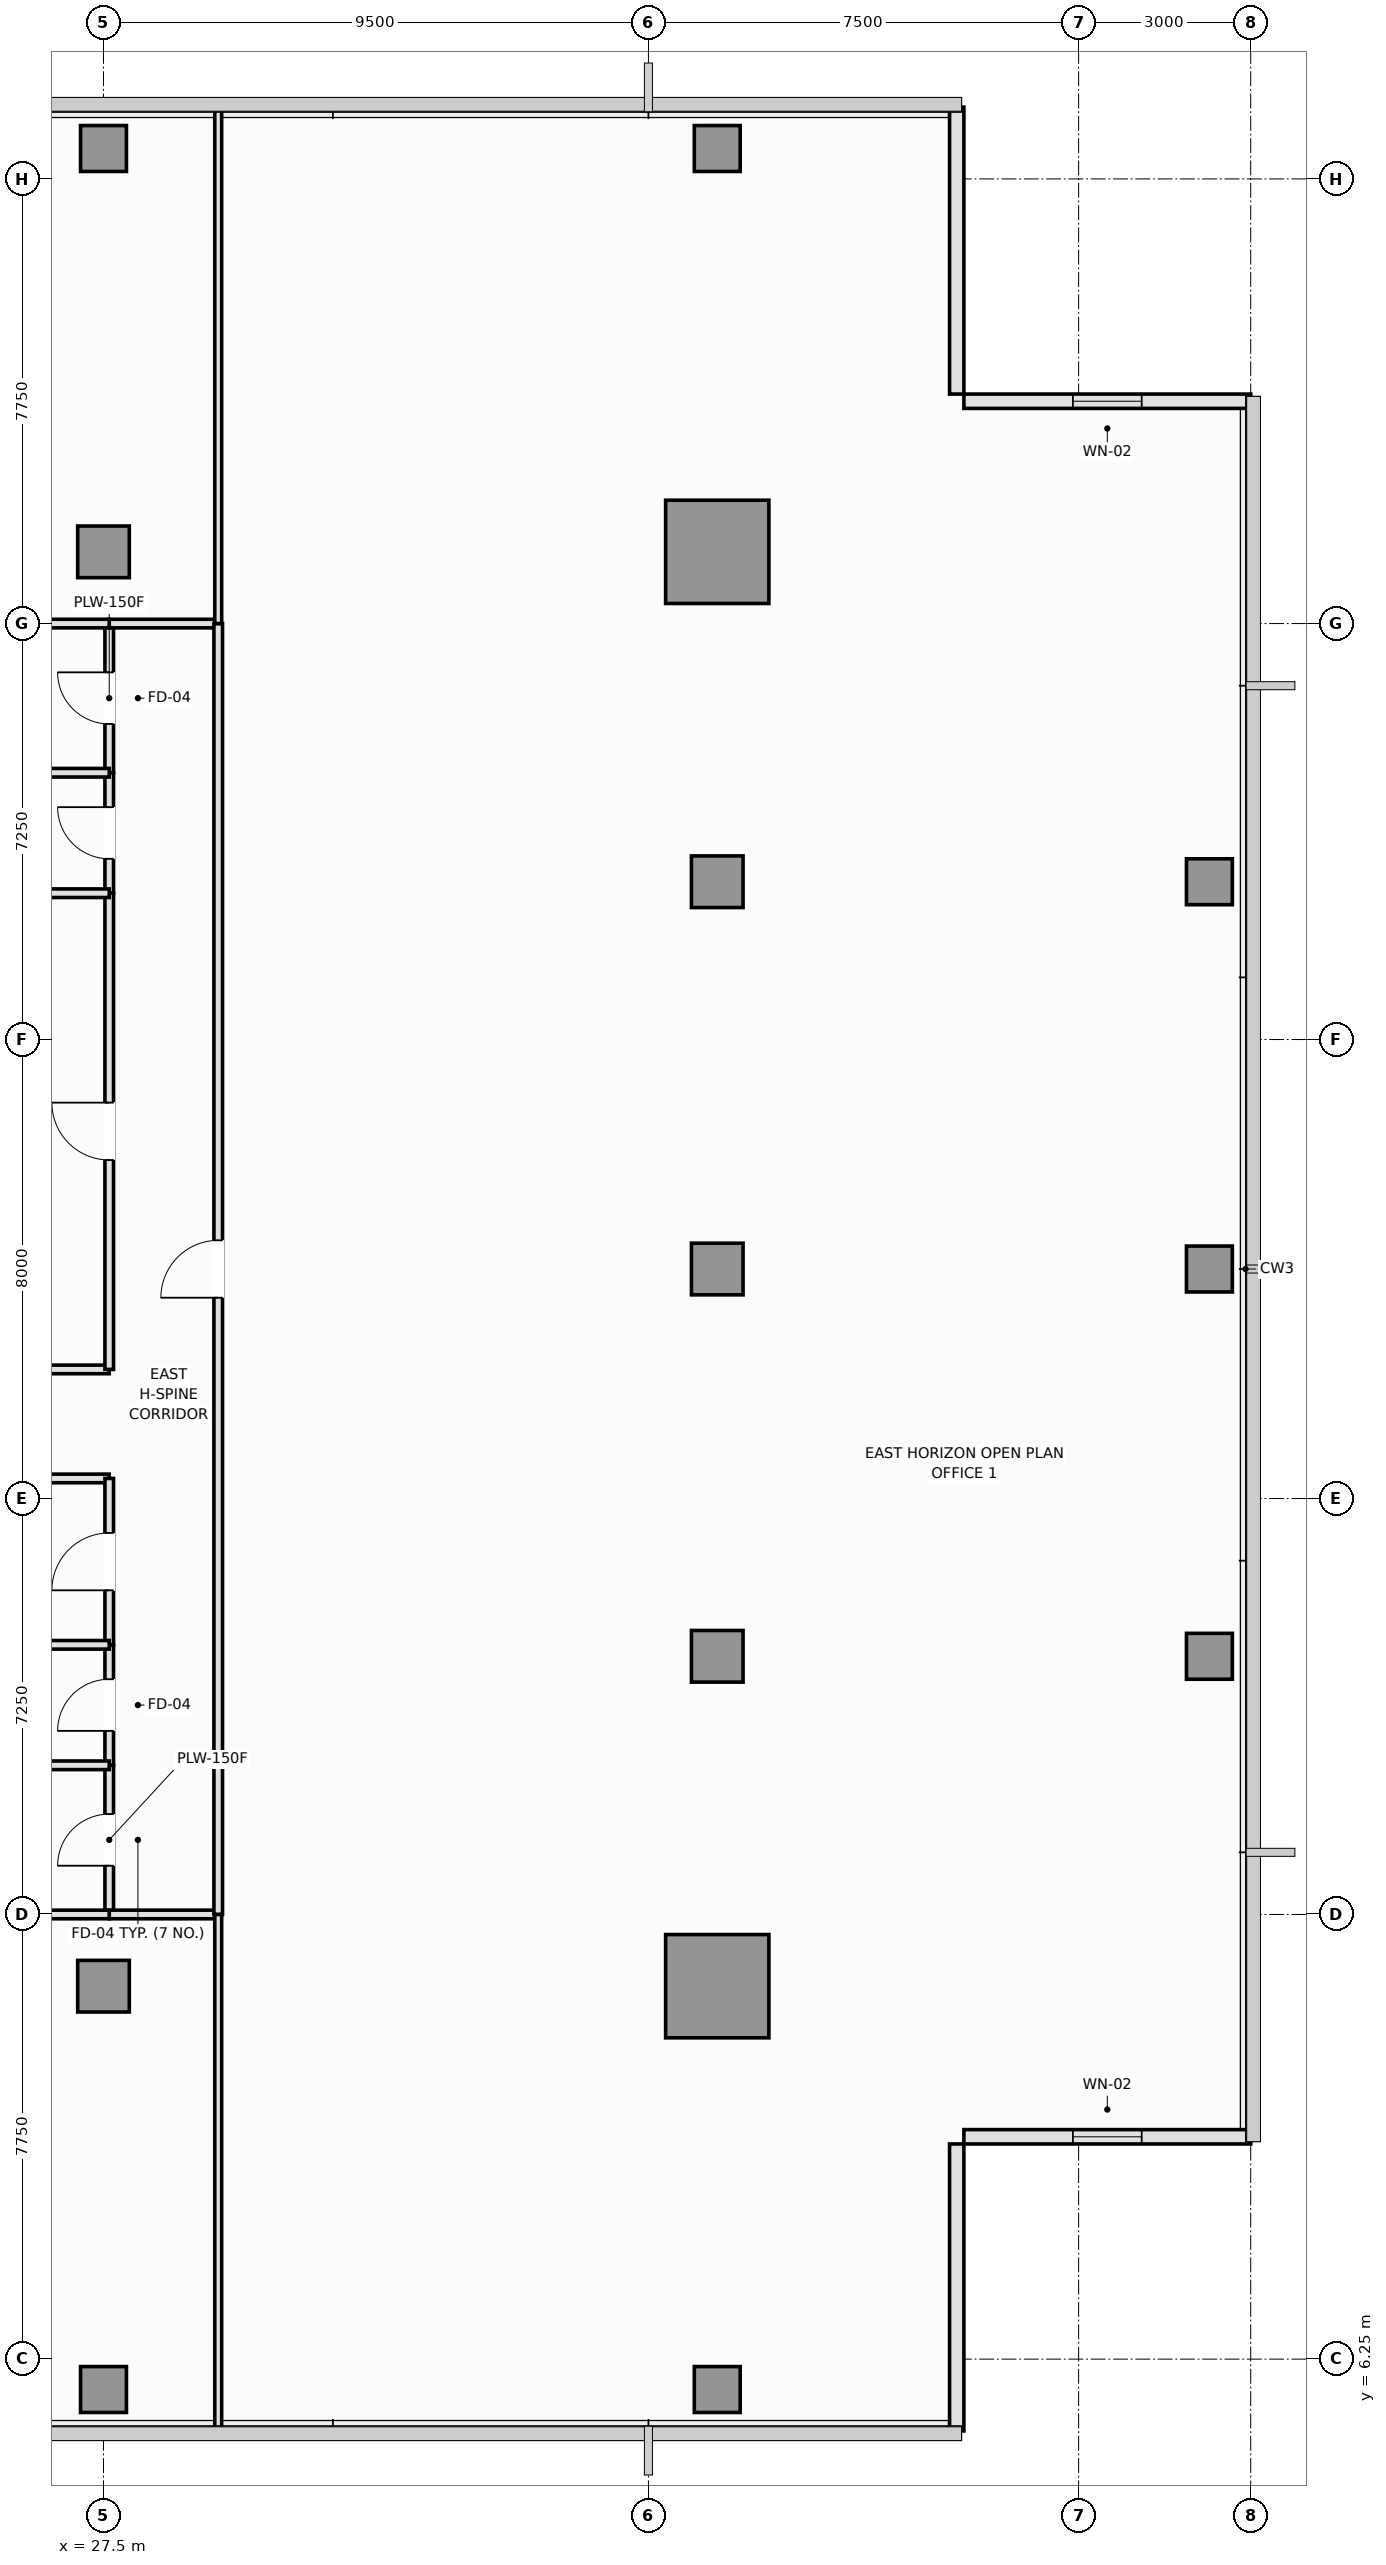
"""IFC4 building model, lengths in metres.
Left out: names, types, materials, properties, quantities, classifications, styles, units other than length and angle.
Written with IfcOpenShell. Run it as: python <this file> out.ifc"""

import sys

from ifc_helpers import new_model, si_unit, direction, frame, frame_2d, origin, origin_2d, place, context, subcontext, project, spatial, rectangle, extrude, element, fill, save


model = new_model("IFC4")
c1 = context("Model", 3, precision=1e-05, world=origin(), true_north=direction((0.0, 1.0)))
c2 = subcontext(c1, "Body", "Model", "MODEL_VIEW")
j1 = project(units=[si_unit("LENGTHUNIT", "METRE"), si_unit("PLANEANGLEUNIT", "RADIAN")], contexts=[c1])
p1 = place(None, origin())
s1 = spatial("IfcSite", under=j1, at=p1, CompositionType="ELEMENT")
p2 = place(p1, origin())
s2 = spatial("IfcBuilding", under=s1, at=p2, CompositionType="ELEMENT")
p3 = place(p2, frame((0.0, 0.0, 191.6)))
s3 = spatial("IfcBuildingStorey", under=s2, at=p3, CompositionType="ELEMENT", Elevation=191.6)
for number, where, z_axis, x_axis in (
    (1, (38.2, 12.75, 0.0), (0.0, 0.0, 1.0), (1.0, 0.0, 0.0)),
    (2, (38.2, 37.75, 0.0), (0.0, 0.0, 1.0), (1.0, 0.0, 0.0)),
):
    element("IfcColumn", number, at=place(p3, frame(where, z_axis=z_axis, x_axis=x_axis)), inside=s3, PredefinedType="COLUMN", context=c2, shape_type="SweptSolid", body=[
        extrude(rectangle(XDim=1.8, YDim=1.8, at=origin_2d()), origin(), (0.0, 0.0, 1.0), 3.55),
    ])
for number, where, z_axis, x_axis in (
    (3, (27.5, 12.75, 0.0), (0.0, 0.0, 1.0), (1.0, 0.0, 0.0)),
    (4, (27.5, 37.75, 0.0), (0.0, 0.0, 1.0), (1.0, 0.0, 0.0)),
    (5, (38.2, 18.5, 0.0), (0.0, 0.0, 1.0), (1.0, 0.0, 0.0)),
    (6, (38.2, 25.25, 0.0), (0.0, 0.0, 1.0), (1.0, 0.0, 0.0)),
    (7, (38.2, 32.0, 0.0), (0.0, 0.0, 1.0), (1.0, 0.0, 0.0)),
):
    element("IfcColumn", number, at=place(p3, frame(where, z_axis=z_axis, x_axis=x_axis)), inside=s3, PredefinedType="COLUMN", context=c2, shape_type="SweptSolid", body=[
        extrude(rectangle(XDim=0.9, YDim=0.9, at=origin_2d()), origin(), (0.0, 0.0, 1.0), 3.55),
    ])
for number, where, z_axis, x_axis in (
    (8, (46.78, 18.5, 0.0), (0.0, 0.0, 1.0), (1.0, 0.0, 0.0)),
    (9, (46.78, 25.25, 0.0), (0.0, 0.0, 1.0), (1.0, 0.0, 0.0)),
    (10, (46.78, 32.0, 0.0), (0.0, 0.0, 1.0), (1.0, 0.0, 0.0)),
    (11, (27.5, 5.72, 0.0), (0.0, 0.0, 1.0), (1.0, 0.0, 0.0)),
    (12, (38.2, 5.72, 0.0), (0.0, 0.0, 1.0), (1.0, 0.0, 0.0)),
    (13, (27.5, 44.78, 0.0), (0.0, 0.0, 1.0), (1.0, 0.0, 0.0)),
    (14, (38.2, 44.78, 0.0), (0.0, 0.0, 1.0), (1.0, 0.0, 0.0)),
):
    element("IfcColumn", number, at=place(p3, frame(where, z_axis=z_axis, x_axis=x_axis)), inside=s3, PredefinedType="COLUMN", context=c2, shape_type="SweptSolid", body=[
        extrude(rectangle(XDim=0.8, YDim=0.8, at=origin_2d()), origin(), (0.0, 0.0, 1.0), 3.55),
    ])
p4 = place(p3, frame((42.375, 5.0, 0.0), z_axis=(0.0, 0.0, 1.0), x_axis=(0.0, 1.0, 0.0)))
e15 = element("IfcWall", 15, at=p4, inside=s3, PredefinedType="SOLIDWALL", context=c2, shape_type="SweptSolid", body=[
    extrude(rectangle(XDim=5.0, YDim=0.25, at=frame_2d((2.5, 0.0))), origin(), (0.0, 0.0, 1.0), 3.37),
])
p5 = place(p3, frame((42.5, 10.125, 0.0), z_axis=(0.0, 0.0, 1.0), x_axis=(1.0, 0.0, 0.0)))
e16 = element("IfcWall", 16, at=p5, inside=s3, PredefinedType="SOLIDWALL", context=c2, shape_type="SweptSolid", body=[
    extrude(rectangle(XDim=5.0, YDim=0.25, at=frame_2d((2.5, 0.0))), origin(), (0.0, 0.0, 1.0), 3.37),
])
p6 = place(p5, frame((1.9, 0.0, 0.9)))
e17 = element("IfcOpeningElement", 17, at=p6, cuts=e16, PredefinedType="OPENING", context=c2, shape_type="SweptSolid", body=[
    extrude(rectangle(XDim=1.2, YDim=1.8, at=frame_2d((0.6, 0.9))), frame((0.0, 0.135, 0.0), z_axis=(0.0, -1.0, 0.0), x_axis=(1.0, 0.0, 0.0)), (0.0, 0.0, 1.0), 0.27),
])
p7 = place(p3, frame((47.5, 40.375, 0.0), z_axis=(0.0, 0.0, 1.0), x_axis=(-1.0, 0.0, 0.0)))
e18 = element("IfcWall", 18, at=p7, inside=s3, PredefinedType="SOLIDWALL", context=c2, shape_type="SweptSolid", body=[
    extrude(rectangle(XDim=5.0, YDim=0.25, at=frame_2d((2.5, 0.0))), origin(), (0.0, 0.0, 1.0), 3.37),
])
p8 = place(p7, frame((1.9, 0.0, 0.9)))
e19 = element("IfcOpeningElement", 19, at=p8, cuts=e18, PredefinedType="OPENING", context=c2, shape_type="SweptSolid", body=[
    extrude(rectangle(XDim=1.2, YDim=1.8, at=frame_2d((0.6, 0.9))), frame((0.0, 0.135, 0.0), z_axis=(0.0, -1.0, 0.0), x_axis=(1.0, 0.0, 0.0)), (0.0, 0.0, 1.0), 0.27),
])
p9 = place(p3, frame((42.375, 40.5, 0.0), z_axis=(0.0, 0.0, 1.0), x_axis=(0.0, 1.0, 0.0)))
e20 = element("IfcWall", 20, at=p9, inside=s3, PredefinedType="SOLIDWALL", context=c2, shape_type="SweptSolid", body=[
    extrude(rectangle(XDim=5.0, YDim=0.25, at=frame_2d((2.5, 0.0))), origin(), (0.0, 0.0, 1.0), 3.37),
])
p10 = place(p3, frame((24.29, 21.6, 0.0), z_axis=(0.0, 0.0, 1.0), x_axis=(1.0, 0.0, 0.0)))
e21 = element("IfcWall", 21, at=p10, inside=s3, PredefinedType="PARTITIONING", context=c2, shape_type="SweptSolid", body=[
    extrude(rectangle(XDim=3.31, YDim=0.15, at=frame_2d((1.655, 0.0))), origin(), (0.0, 0.0, 1.0), 3.37),
])
p11 = place(p3, frame((23.06, 23.5, 0.0), z_axis=(0.0, 0.0, 1.0), x_axis=(1.0, 0.0, 0.0)))
e22 = element("IfcWall", 22, at=p11, inside=s3, PredefinedType="PARTITIONING", context=c2, shape_type="SweptSolid", body=[
    extrude(rectangle(XDim=4.54, YDim=0.15, at=frame_2d((2.27, 0.0))), origin(), (0.0, 0.0, 1.0), 3.37),
])
p12 = place(p3, frame((27.6, 14.0, 0.0), z_axis=(0.0, 0.0, 1.0), x_axis=(0.0, 1.0, 0.0)))
e23 = element("IfcWall", 23, at=p12, inside=s3, PredefinedType="PLUMBINGWALL", context=c2, shape_type="SweptSolid", body=[
    extrude(rectangle(XDim=2.6, YDim=0.15, at=frame_2d((1.3, 0.0))), origin(), (0.0, 0.0, 1.0), 3.37),
])
p13 = place(p12, frame((0.85, 0.0, 0.0)))
e24 = element("IfcOpeningElement", 24, at=p13, cuts=e23, PredefinedType="OPENING", context=c2, shape_type="SweptSolid", body=[
    extrude(rectangle(XDim=0.9, YDim=2.1, at=frame_2d((0.45, 1.05))), frame((0.0, 0.085, 0.0), z_axis=(0.0, -1.0, 0.0), x_axis=(1.0, 0.0, 0.0)), (0.0, 0.0, 1.0), 0.17),
])
p14 = place(p3, frame((27.6, 33.9, 0.0), z_axis=(0.0, 0.0, 1.0), x_axis=(0.0, 1.0, 0.0)))
e25 = element("IfcWall", 25, at=p14, inside=s3, PredefinedType="PLUMBINGWALL", context=c2, shape_type="SweptSolid", body=[
    extrude(rectangle(XDim=2.6, YDim=0.15, at=frame_2d((1.3, 0.0))), origin(), (0.0, 0.0, 1.0), 3.37),
])
p15 = place(p14, frame((0.85, 0.0, 0.0)))
e26 = element("IfcOpeningElement", 26, at=p15, cuts=e25, PredefinedType="OPENING", context=c2, shape_type="SweptSolid", body=[
    extrude(rectangle(XDim=0.9, YDim=2.1, at=frame_2d((0.45, 1.05))), frame((0.0, 0.085, 0.0), z_axis=(0.0, -1.0, 0.0), x_axis=(1.0, 0.0, 0.0)), (0.0, 0.0, 1.0), 0.17),
])
p16 = place(p3, frame((27.6, 16.6, 0.0), z_axis=(0.0, 0.0, 1.0), x_axis=(0.0, 1.0, 0.0)))
e27 = element("IfcWall", 27, at=p16, inside=s3, PredefinedType="PLUMBINGWALL", context=c2, shape_type="SweptSolid", body=[
    extrude(rectangle(XDim=2.1, YDim=0.15, at=frame_2d((1.05, 0.0))), origin(), (0.0, 0.0, 1.0), 3.37),
])
p17 = place(p16, frame((0.6, 0.0, 0.0)))
e28 = element("IfcOpeningElement", 28, at=p17, cuts=e27, PredefinedType="OPENING", context=c2, shape_type="SweptSolid", body=[
    extrude(rectangle(XDim=0.9, YDim=2.1, at=frame_2d((0.45, 1.05))), frame((0.0, 0.085, 0.0), z_axis=(0.0, -1.0, 0.0), x_axis=(1.0, 0.0, 0.0)), (0.0, 0.0, 1.0), 0.17),
])
p18 = place(p3, frame((27.6, 31.8, 0.0), z_axis=(0.0, 0.0, 1.0), x_axis=(0.0, 1.0, 0.0)))
e29 = element("IfcWall", 29, at=p18, inside=s3, PredefinedType="PLUMBINGWALL", context=c2, shape_type="SweptSolid", body=[
    extrude(rectangle(XDim=2.1, YDim=0.15, at=frame_2d((1.05, 0.0))), origin(), (0.0, 0.0, 1.0), 3.37),
])
p19 = place(p18, frame((0.6, 0.0, 0.0)))
e30 = element("IfcOpeningElement", 30, at=p19, cuts=e29, PredefinedType="OPENING", context=c2, shape_type="SweptSolid", body=[
    extrude(rectangle(XDim=0.9, YDim=2.1, at=frame_2d((0.45, 1.05))), frame((0.0, 0.085, 0.0), z_axis=(0.0, -1.0, 0.0), x_axis=(1.0, 0.0, 0.0)), (0.0, 0.0, 1.0), 0.17),
])
p20 = place(p3, frame((27.6, 18.7, 0.0), z_axis=(0.0, 0.0, 1.0), x_axis=(0.0, 1.0, 0.0)))
e31 = element("IfcWall", 31, at=p20, inside=s3, PredefinedType="PARTITIONING", context=c2, shape_type="SweptSolid", body=[
    extrude(rectangle(XDim=2.9, YDim=0.15, at=frame_2d((1.45, 0.0))), origin(), (0.0, 0.0, 1.0), 3.37),
])
p21 = place(p20, frame((0.95, 0.0, 0.0)))
e32 = element("IfcOpeningElement", 32, at=p21, cuts=e31, PredefinedType="OPENING", context=c2, shape_type="SweptSolid", body=[
    extrude(rectangle(XDim=1.0, YDim=2.15, at=frame_2d((0.5, 1.075))), frame((0.0, 0.085, 0.0), z_axis=(0.0, -1.0, 0.0), x_axis=(1.0, 0.0, 0.0)), (0.0, 0.0, 1.0), 0.17),
])
p22 = place(p3, frame((27.6, 23.5, 0.0), z_axis=(0.0, 0.0, 1.0), x_axis=(0.0, 1.0, 0.0)))
e33 = element("IfcWall", 33, at=p22, inside=s3, PredefinedType="PARTITIONING", context=c2, shape_type="SweptSolid", body=[
    extrude(rectangle(XDim=8.3, YDim=0.15, at=frame_2d((4.15, 0.0))), origin(), (0.0, 0.0, 1.0), 3.37),
])
p23 = place(p22, frame((3.65, 0.0, 0.0)))
e34 = element("IfcOpeningElement", 34, at=p23, cuts=e33, PredefinedType="OPENING", context=c2, shape_type="SweptSolid", body=[
    extrude(rectangle(XDim=1.0, YDim=2.15, at=frame_2d((0.5, 1.075))), frame((0.0, 0.085, 0.0), z_axis=(0.0, -1.0, 0.0), x_axis=(1.0, 0.0, 0.0)), (0.0, 0.0, 1.0), 0.17),
])
for number, where, z_axis, x_axis in (
    (35, (27.6, 14.0, 0.0), (0.0, 0.0, 1.0), (1.0, 0.0, 0.0)),
    (36, (27.6, 36.5, 0.0), (0.0, 0.0, 1.0), (1.0, 0.0, 0.0)),
):
    element("IfcWall", number, at=place(p3, frame(where, z_axis=z_axis, x_axis=x_axis)), inside=s3, PredefinedType="PARTITIONING", context=c2, shape_type="SweptSolid", body=[
        extrude(rectangle(XDim=1.9, YDim=0.15, at=frame_2d((0.95, 0.0))), origin(), (0.0, 0.0, 1.0), 3.37),
    ])
p24 = place(p3, frame((29.5, 14.0, 0.0), z_axis=(0.0, 0.0, 1.0), x_axis=(0.0, 1.0, 0.0)))
e37 = element("IfcWall", 37, at=p24, inside=s3, PredefinedType="PARTITIONING", context=c2, shape_type="SweptSolid", body=[
    extrude(rectangle(XDim=22.5, YDim=0.15, at=frame_2d((11.25, 0.0))), origin(), (0.0, 0.0, 1.0), 3.37),
])
p25 = place(p24, frame((10.75, 0.0, 0.0)))
e38 = element("IfcOpeningElement", 38, at=p25, cuts=e37, PredefinedType="OPENING", context=c2, shape_type="SweptSolid", body=[
    extrude(rectangle(XDim=1.0, YDim=2.15, at=frame_2d((0.5, 1.075))), frame((0.0, 0.085, 0.0), z_axis=(0.0, -1.0, 0.0), x_axis=(1.0, 0.0, 0.0)), (0.0, 0.0, 1.0), 0.17),
])
for number, where, z_axis, x_axis in (
    (39, (24.1, 16.6, 0.0), (0.0, 0.0, 1.0), (1.0, 0.0, 0.0)),
    (40, (24.1, 14.0, 0.0), (0.0, 0.0, 1.0), (1.0, 0.0, 0.0)),
    (41, (24.1, 33.9, 0.0), (0.0, 0.0, 1.0), (1.0, 0.0, 0.0)),
    (42, (24.1, 36.5, 0.0), (0.0, 0.0, 1.0), (1.0, 0.0, 0.0)),
):
    element("IfcWall", number, at=place(p3, frame(where, z_axis=z_axis, x_axis=x_axis)), inside=s3, PredefinedType="PLUMBINGWALL", context=c2, shape_type="SweptSolid", body=[
        extrude(rectangle(XDim=3.5, YDim=0.15, at=frame_2d((1.75, 0.0))), origin(), (0.0, 0.0, 1.0), 3.37),
    ])
p26 = place(p3, frame((24.29, 18.7, 0.0), z_axis=(0.0, 0.0, 1.0), x_axis=(1.0, 0.0, 0.0)))
e43 = element("IfcWall", 43, at=p26, inside=s3, PredefinedType="PLUMBINGWALL", context=c2, shape_type="SweptSolid", body=[
    extrude(rectangle(XDim=3.31, YDim=0.15, at=frame_2d((1.655, 0.0))), origin(), (0.0, 0.0, 1.0), 3.37),
])
p27 = place(p3, frame((24.1, 31.8, 0.0), z_axis=(0.0, 0.0, 1.0), x_axis=(1.0, 0.0, 0.0)))
e44 = element("IfcWall", 44, at=p27, inside=s3, PredefinedType="PLUMBINGWALL", context=c2, shape_type="SweptSolid", body=[
    extrude(rectangle(XDim=3.5, YDim=0.15, at=frame_2d((1.75, 0.0))), origin(), (0.0, 0.0, 1.0), 3.37),
])
for number, where, z_axis, x_axis in (
    (45, (29.5, 5.01, 0.0), (0.0, 0.0, 1.0), (0.0, 1.0, 0.0)),
    (46, (29.5, 36.5, 0.0), (0.0, 0.0, 1.0), (0.0, 1.0, 0.0)),
):
    element("IfcWall", number, at=place(p3, frame(where, z_axis=z_axis, x_axis=x_axis)), inside=s3, PredefinedType="PARTITIONING", context=c2, shape_type="SweptSolid", body=[
        extrude(rectangle(XDim=8.99, YDim=0.12, at=frame_2d((4.495, 0.0))), origin(), (0.0, 0.0, 1.0), 3.37),
    ])
p28 = place(p6, origin())
e47 = element("IfcWindow", 47, at=p28, inside=s3, PartitioningType="SINGLE_PANEL", PredefinedType="WINDOW", context=c2, shape_type="SweptSolid", body=[
    extrude(rectangle(XDim=1.2, YDim=1.8, at=frame_2d((0.6, 0.9))), frame((0.0, 0.03, 0.0), z_axis=(0.0, -1.0, 0.0), x_axis=(1.0, 0.0, 0.0)), (0.0, 0.0, 1.0), 0.06),
])
fill(e17, e47)
p29 = place(p8, origin())
e48 = element("IfcWindow", 48, at=p29, inside=s3, PartitioningType="SINGLE_PANEL", PredefinedType="WINDOW", context=c2, shape_type="SweptSolid", body=[
    extrude(rectangle(XDim=1.2, YDim=1.8, at=frame_2d((0.6, 0.9))), frame((0.0, 0.03, 0.0), z_axis=(0.0, -1.0, 0.0), x_axis=(1.0, 0.0, 0.0)), (0.0, 0.0, 1.0), 0.06),
])
fill(e19, e48)
p30 = place(p13, origin())
e49 = element("IfcDoor", 49, at=p30, inside=s3, OperationType="SINGLE_SWING_LEFT", PredefinedType="DOOR", context=c2, shape_type="SweptSolid", body=[
    extrude(rectangle(XDim=0.9, YDim=2.1, at=frame_2d((0.45, 1.05))), frame((0.0, 0.025, 0.0), z_axis=(0.0, -1.0, 0.0), x_axis=(1.0, 0.0, 0.0)), (0.0, 0.0, 1.0), 0.05),
])
fill(e24, e49)
p31 = place(p15, origin())
e50 = element("IfcDoor", 50, at=p31, inside=s3, OperationType="SINGLE_SWING_RIGHT", PredefinedType="DOOR", context=c2, shape_type="SweptSolid", body=[
    extrude(rectangle(XDim=0.9, YDim=2.1, at=frame_2d((0.45, 1.05))), frame((0.0, 0.025, 0.0), z_axis=(0.0, -1.0, 0.0), x_axis=(1.0, 0.0, 0.0)), (0.0, 0.0, 1.0), 0.05),
])
fill(e26, e50)
p32 = place(p17, origin())
e51 = element("IfcDoor", 51, at=p32, inside=s3, OperationType="SINGLE_SWING_LEFT", PredefinedType="DOOR", context=c2, shape_type="SweptSolid", body=[
    extrude(rectangle(XDim=0.9, YDim=2.1, at=frame_2d((0.45, 1.05))), frame((0.0, 0.025, 0.0), z_axis=(0.0, -1.0, 0.0), x_axis=(1.0, 0.0, 0.0)), (0.0, 0.0, 1.0), 0.05),
])
fill(e28, e51)
p33 = place(p19, origin())
e52 = element("IfcDoor", 52, at=p33, inside=s3, OperationType="SINGLE_SWING_RIGHT", PredefinedType="DOOR", context=c2, shape_type="SweptSolid", body=[
    extrude(rectangle(XDim=0.9, YDim=2.1, at=frame_2d((0.45, 1.05))), frame((0.0, 0.025, 0.0), z_axis=(0.0, -1.0, 0.0), x_axis=(1.0, 0.0, 0.0)), (0.0, 0.0, 1.0), 0.05),
])
fill(e30, e52)
p34 = place(p21, origin())
e53 = element("IfcDoor", 53, at=p34, inside=s3, OperationType="SINGLE_SWING_LEFT", PredefinedType="DOOR", context=c2, shape_type="SweptSolid", body=[
    extrude(rectangle(XDim=1.0, YDim=2.15, at=frame_2d((0.5, 1.075))), frame((0.0, 0.025, 0.0), z_axis=(0.0, -1.0, 0.0), x_axis=(1.0, 0.0, 0.0)), (0.0, 0.0, 1.0), 0.05),
])
fill(e32, e53)
p35 = place(p23, origin())
e54 = element("IfcDoor", 54, at=p35, inside=s3, OperationType="SINGLE_SWING_RIGHT", PredefinedType="DOOR", context=c2, shape_type="SweptSolid", body=[
    extrude(rectangle(XDim=1.0, YDim=2.15, at=frame_2d((0.5, 1.075))), frame((0.0, 0.025, 0.0), z_axis=(0.0, -1.0, 0.0), x_axis=(1.0, 0.0, 0.0)), (0.0, 0.0, 1.0), 0.05),
])
fill(e34, e54)
p36 = place(p25, origin())
e55 = element("IfcDoor", 55, at=p36, inside=s3, OperationType="SINGLE_SWING_LEFT", PredefinedType="DOOR", context=c2, shape_type="SweptSolid", body=[
    extrude(rectangle(XDim=1.0, YDim=2.15, at=frame_2d((0.5, 1.075))), frame((0.0, 0.025, 0.0), z_axis=(0.0, -1.0, 0.0), x_axis=(1.0, 0.0, 0.0)), (0.0, 0.0, 1.0), 0.05),
])
fill(e38, e55)
save(model, sys.argv[1])
